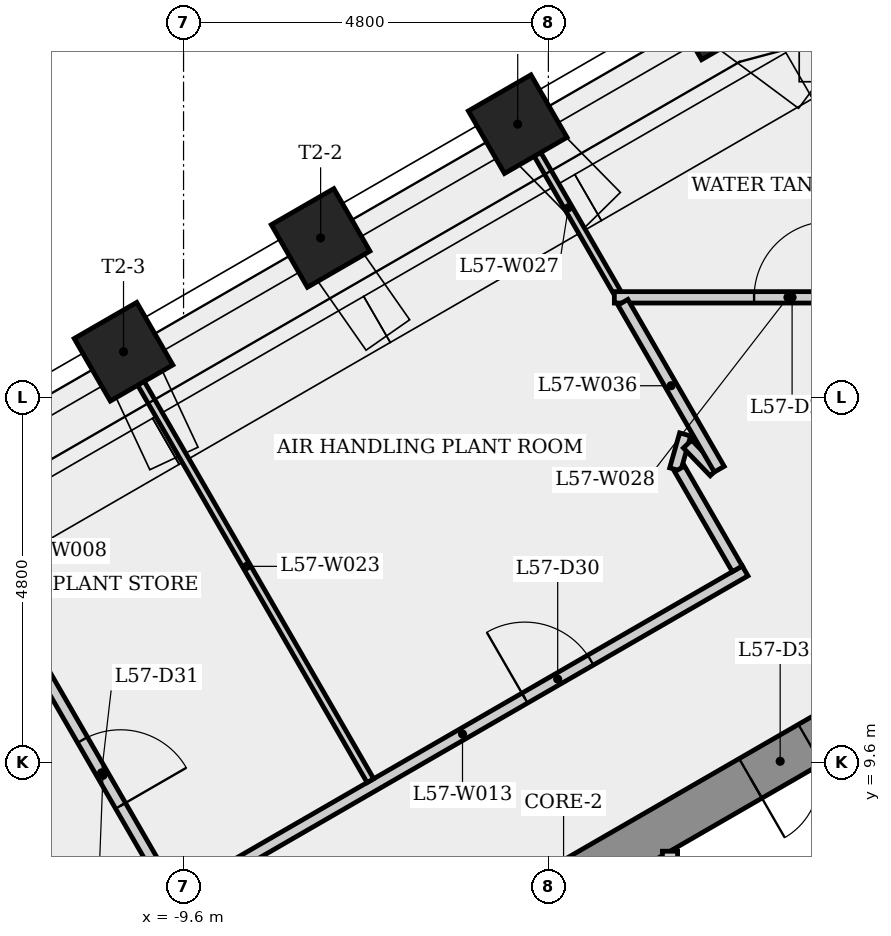
"""IFC4 building model, lengths in metres.
Left out: names, types, materials, properties, quantities, classifications, styles, units other than length and angle.
Written with IfcOpenShell. Run it as: python <this file> out.ifc"""

import sys

from ifc_helpers import new_model, si_unit, direction, frame, frame_2d, origin, origin_2d, place, context, subcontext, project, spatial, rectangle, extrude, element, fill, save


model = new_model("IFC4")
c1 = context("Model", 3, precision=1e-05, world=origin(), true_north=direction((0.0, 1.0)))
c2 = subcontext(c1, "Body", "Model", "MODEL_VIEW")
j1 = project(units=[si_unit("LENGTHUNIT", "METRE"), si_unit("PLANEANGLEUNIT", "RADIAN")], contexts=[c1])
p1 = place(None, origin())
s1 = spatial("IfcSite", under=j1, at=p1, CompositionType="ELEMENT")
p2 = place(p1, origin())
s2 = spatial("IfcBuilding", under=s1, at=p2, CompositionType="ELEMENT")
p3 = place(p2, frame((0.0, 0.0, 214.1)))
s3 = spatial("IfcBuildingStorey", under=s2, at=p3, CompositionType="ELEMENT", Elevation=214.1)
p4 = place(p3, frame((0.15, 10.71, 0.0), z_axis=(0.0, 0.0, 1.0), x_axis=(-0.866023993627, -0.500002442456, 0.0)))
e1 = element("IfcWall", 1, at=p4, inside=s3, PredefinedType="SHEAR", context=c2, shape_type="SweptSolid", body=[
    extrude(rectangle(XDim=10.97, YDim=0.6, at=frame_2d((5.485, 0.0))), origin(), (0.0, 0.0, 1.0), 4.8),
])
p5 = place(p4, frame((9.201, 0.0, 0.0)))
e2 = element("IfcOpeningElement", 2, at=p5, cuts=e1, PredefinedType="OPENING", context=c2, shape_type="SweptSolid", body=[
    extrude(rectangle(XDim=0.9, YDim=2.1, at=frame_2d((0.45, 1.05))), frame((0.0, 0.31, 0.0), z_axis=(0.0, -1.0, 0.0), x_axis=(1.0, 0.0, 0.0)), (0.0, 0.0, 1.0), 0.62),
])
p6 = place(p4, frame((1.744, 0.0, 0.0)))
e3 = element("IfcOpeningElement", 3, at=p6, cuts=e1, PredefinedType="OPENING", context=c2, shape_type="SweptSolid", body=[
    extrude(rectangle(XDim=0.9, YDim=2.1, at=frame_2d((0.45, 1.05))), frame((0.0, 0.31, 0.0), z_axis=(0.0, -1.0, 0.0), x_axis=(1.0, 0.0, 0.0)), (0.0, 0.0, 1.0), 0.62),
])
for number, where, z_axis, x_axis in (
    (4, (-2.611, 19.493, 0.0), (0.0, 0.0, 1.0), (-0.5, 0.866, 0.0)),
    (5, (-5.204, 17.996, 0.0), (0.0, 0.0, 1.0), (-0.5, 0.866, 0.0)),
    (6, (-7.797, 16.499, 0.0), (0.0, 0.0, 1.0), (-0.5, 0.866, 0.0)),
    (7, (-10.39, 15.001, 0.0), (0.0, 0.0, 1.0), (-0.5, 0.866, 0.0)),
):
    element("IfcColumn", number, at=place(p3, frame(where, z_axis=z_axis, x_axis=x_axis)), inside=s3, PredefinedType="COLUMN", context=c2, shape_type="SweptSolid", body=[
        extrude(rectangle(XDim=0.95, YDim=0.95, at=origin_2d()), origin(), (0.0, 0.0, 1.0), 4.45),
    ])
p7 = place(p3, frame((-11.646, 11.134, 0.0), z_axis=(0.0, 0.0, 1.0), x_axis=(0.500044270822, -0.865999842505, 0.0)))
e8 = element("IfcWall", 8, at=p7, inside=s3, PredefinedType="PARTITIONING", context=c2, shape_type="SweptSolid", body=[
    extrude(rectangle(XDim=3.94, YDim=0.15, at=frame_2d((1.97, 0.0))), origin(), (0.0, 0.0, 1.0), 4.45),
])
p8 = place(p7, frame((1.433, 0.0, 0.0)))
e9 = element("IfcOpeningElement", 9, at=p8, cuts=e8, PredefinedType="OPENING", context=c2, shape_type="SweptSolid", body=[
    extrude(rectangle(XDim=1.0, YDim=2.1, at=frame_2d((0.5, 1.05))), frame((0.0, 0.085, 0.0), z_axis=(0.0, -1.0, 0.0), x_axis=(1.0, 0.0, 0.0)), (0.0, 0.0, 1.0), 0.17),
])
p9 = place(p3, frame((-9.648, 7.824, 0.0), z_axis=(0.0, 0.0, 1.0), x_axis=(0.866024597333, 0.500001396812, 0.0)))
e10 = element("IfcWall", 10, at=p9, inside=s3, PredefinedType="PARTITIONING", context=c2, shape_type="SweptSolid", body=[
    extrude(rectangle(XDim=8.586, YDim=0.15, at=frame_2d((4.293, 0.0))), origin(), (0.0, 0.0, 1.0), 4.45),
])
p10 = place(p9, frame((5.239, 0.0, 0.0)))
e11 = element("IfcOpeningElement", 11, at=p10, cuts=e10, PredefinedType="OPENING", context=c2, shape_type="SweptSolid", body=[
    extrude(rectangle(XDim=1.0, YDim=2.1, at=frame_2d((0.5, 1.05))), frame((0.0, 0.085, 0.0), z_axis=(0.0, -1.0, 0.0), x_axis=(1.0, 0.0, 0.0)), (0.0, 0.0, 1.0), 0.17),
])
p11 = place(p3, frame((-7.142, 9.358, 0.0), z_axis=(0.0, 0.0, 1.0), x_axis=(-0.500010221068, 0.866019502567, 0.0)))
e12 = element("IfcWall", 12, at=p11, inside=s3, PredefinedType="PARTITIONING", context=c2, shape_type="SweptSolid", body=[
    extrude(rectangle(XDim=6.511, YDim=0.1, at=frame_2d((3.256, 0.0))), origin(), (0.0, 0.0, 1.0), 2.825),
])
p12 = place(p3, frame((-3.895, 15.782, 0.0), z_axis=(0.0, 0.0, 1.0), x_axis=(-0.50002925274, 0.866008514048, 0.0)))
e13 = element("IfcWall", 13, at=p12, inside=s3, PredefinedType="PARTITIONING", context=c2, shape_type="SweptSolid", body=[
    extrude(rectangle(XDim=2.572, YDim=0.1, at=frame_2d((1.286, 0.0))), origin(), (0.0, 0.0, 1.0), 2.825),
])
p13 = place(p3, frame((-3.932, 15.717, 0.0), z_axis=(0.0, 0.0, 1.0), x_axis=(1.0, 0.0, 0.0)))
e14 = element("IfcWall", 14, at=p13, inside=s3, PredefinedType="PARTITIONING", context=c2, shape_type="SweptSolid", body=[
    extrude(rectangle(XDim=4.568, YDim=0.15, at=frame_2d((2.284, 0.0))), origin(), (0.0, 0.0, 1.0), 4.45),
])
p14 = place(p13, frame((1.839, 0.0, 0.0)))
e15 = element("IfcOpeningElement", 15, at=p14, cuts=e14, PredefinedType="OPENING", context=c2, shape_type="SweptSolid", body=[
    extrude(rectangle(XDim=1.0, YDim=2.1, at=frame_2d((0.5, 1.05))), frame((0.0, 0.085, 0.0), z_axis=(0.0, -1.0, 0.0), x_axis=(1.0, 0.0, 0.0)), (0.0, 0.0, 1.0), 0.17),
])
p15 = place(p3, frame((-3.2, 8.429, 0.0), z_axis=(0.0, 0.0, 1.0), x_axis=(0.0, -1.0, 0.0)))
e16 = element("IfcWall", 16, at=p15, inside=s3, PredefinedType="PARTITIONING", context=c2, shape_type="SweptSolid", body=[
    extrude(rectangle(XDim=3.154, YDim=0.2, at=frame_2d((1.577, 0.0))), origin(), (0.0, 0.0, 1.0), 4.45),
])
p16 = place(p3, frame((-3.132, 13.453, 0.0), z_axis=(0.0, 0.0, 1.0), x_axis=(0.273373621289, 0.961907928641, 0.0)))
e17 = element("IfcWall", 17, at=p16, inside=s3, PredefinedType="PARTITIONING", context=c2, shape_type="SweptSolid", body=[
    extrude(rectangle(XDim=0.479, YDim=0.15, at=frame_2d((0.239, 0.0))), origin(), (0.0, 0.0, 1.0), 4.45),
])
p17 = place(p3, frame((-2.969, 13.787, 0.0), z_axis=(0.0, 0.0, 1.0), x_axis=(0.694020012532, -0.719955708502, 0.0)))
e18 = element("IfcWall", 18, at=p17, inside=s3, PredefinedType="PARTITIONING", context=c2, shape_type="SweptSolid", body=[
    extrude(rectangle(XDim=0.508, YDim=0.15, at=frame_2d((0.254, 0.0))), origin(), (0.0, 0.0, 1.0), 4.45),
])
p18 = place(p3, frame((-2.552, 13.456, 0.0), z_axis=(0.0, 0.0, 1.0), x_axis=(-0.500011333847, 0.866018860086, 0.0)))
e19 = element("IfcWall", 19, at=p18, inside=s3, PredefinedType="PARTITIONING", context=c2, shape_type="SweptSolid", body=[
    extrude(rectangle(XDim=2.536, YDim=0.15, at=frame_2d((1.268, 0.0))), origin(), (0.0, 0.0, 1.0), 4.45),
])
p19 = place(p3, frame((-2.314, 12.145, 0.0), z_axis=(0.0, 0.0, 1.0), x_axis=(-0.499977585228, 0.866038344573, 0.0)))
e20 = element("IfcWall", 20, at=p19, inside=s3, PredefinedType="PARTITIONING", context=c2, shape_type="SweptSolid", body=[
    extrude(rectangle(XDim=1.519, YDim=0.15, at=frame_2d((0.759, 0.0))), origin(), (0.0, 0.0, 1.0), 4.45),
])
p20 = place(p14, origin())
e21 = element("IfcDoor", 21, at=p20, inside=s3, OperationType="SINGLE_SWING_RIGHT", PredefinedType="DOOR", context=c2, shape_type="SweptSolid", body=[
    extrude(rectangle(XDim=1.0, YDim=2.1, at=frame_2d((0.5, 1.05))), frame((0.0, 0.025, 0.0), z_axis=(0.0, -1.0, 0.0), x_axis=(1.0, 0.0, 0.0)), (0.0, 0.0, 1.0), 0.05),
])
fill(e15, e21)
p21 = place(p10, origin())
e22 = element("IfcDoor", 22, at=p21, inside=s3, OperationType="SINGLE_SWING_LEFT", PredefinedType="DOOR", context=c2, shape_type="SweptSolid", body=[
    extrude(rectangle(XDim=1.0, YDim=2.1, at=frame_2d((0.5, 1.05))), frame((0.0, 0.025, 0.0), z_axis=(0.0, -1.0, 0.0), x_axis=(1.0, 0.0, 0.0)), (0.0, 0.0, 1.0), 0.05),
])
fill(e11, e22)
p22 = place(p8, origin())
e23 = element("IfcDoor", 23, at=p22, inside=s3, OperationType="SINGLE_SWING_RIGHT", PredefinedType="DOOR", context=c2, shape_type="SweptSolid", body=[
    extrude(rectangle(XDim=1.0, YDim=2.1, at=frame_2d((0.5, 1.05))), frame((0.0, 0.025, 0.0), z_axis=(0.0, -1.0, 0.0), x_axis=(1.0, 0.0, 0.0)), (0.0, 0.0, 1.0), 0.05),
])
fill(e9, e23)
p23 = place(p6, origin())
e24 = element("IfcDoor", 24, at=p23, inside=s3, OperationType="SINGLE_SWING_RIGHT", PredefinedType="DOOR", context=c2, shape_type="SweptSolid", body=[
    extrude(rectangle(XDim=0.9, YDim=2.1, at=frame_2d((0.45, 1.05))), frame((0.0, 0.025, 0.0), z_axis=(0.0, -1.0, 0.0), x_axis=(1.0, 0.0, 0.0)), (0.0, 0.0, 1.0), 0.05),
])
fill(e3, e24)
save(model, sys.argv[1])
